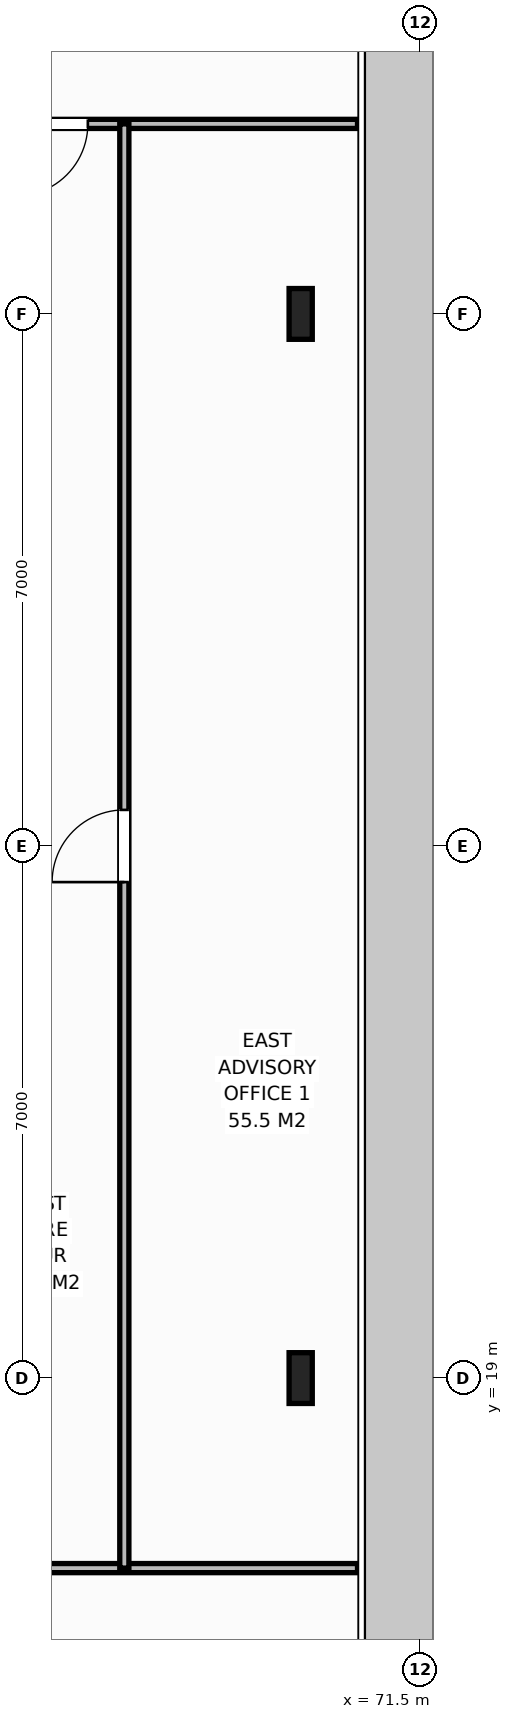
"""IFC4 building model, lengths in metres.
Left out: names, types, materials, properties, quantities, classifications, styles, units other than length and angle.
Written with IfcOpenShell. Run it as: python <this file> out.ifc"""

import sys

from ifc_helpers import new_model, si_unit, direction, frame, frame_2d, origin, origin_2d, place, context, subcontext, project, spatial, rectangle, i_section, extrude, element, fill, save


model = new_model("IFC4")
c1 = context("Model", 3, precision=1e-05, world=origin(), true_north=direction((0.0, 1.0)))
c2 = subcontext(c1, "Body", "Model", "MODEL_VIEW")
j1 = project(units=[si_unit("LENGTHUNIT", "METRE"), si_unit("PLANEANGLEUNIT", "RADIAN")], contexts=[c1])
p1 = place(None, origin())
s1 = spatial("IfcSite", under=j1, at=p1, CompositionType="ELEMENT")
p2 = place(p1, origin())
s2 = spatial("IfcBuilding", under=s1, at=p2, CompositionType="ELEMENT")
p3 = place(p2, frame((0.0, 0.0, 259.4)))
s3 = spatial("IfcBuildingStorey", under=s2, at=p3, CompositionType="ELEMENT", Elevation=259.4)
for number, where, z_axis, x_axis in (
    (1, (69.92, 19.0, 0.0), (0.0, 0.0, 1.0), (1.0, 0.0, 0.0)),
    (2, (69.92, 33.0, 0.0), (0.0, 0.0, 1.0), (1.0, 0.0, 0.0)),
):
    element("IfcColumn", number, at=place(p3, frame(where, z_axis=z_axis, x_axis=x_axis)), inside=s3, PredefinedType="COLUMN", context=c2, shape_type="SweptSolid", body=[
        extrude(i_section(OverallWidth=0.305, OverallDepth=0.668, WebThickness=0.021, FlangeThickness=0.04, at=origin_2d()), origin(), (0.0, 0.0, 1.0), 3.8),
    ])
p4 = place(p3, frame((64.952, 35.5, 0.0), z_axis=(0.0, 0.0, 1.0), x_axis=(1.0, 0.0, 0.0)))
e3 = element("IfcWall", 3, at=p4, inside=s3, PredefinedType="PARTITIONING", context=c2, shape_type="SweptSolid", body=[
    extrude(rectangle(XDim=5.716, YDim=0.12, at=frame_2d((2.858, 0.0))), origin(), (0.0, 0.0, 1.0), 3.588),
])
p5 = place(p4, frame((1.218, 0.0, 0.0)))
e4 = element("IfcOpeningElement", 4, at=p5, cuts=e3, PredefinedType="OPENING", context=c2, shape_type="SweptSolid", body=[
    extrude(rectangle(XDim=0.95, YDim=2.15, at=frame_2d((0.475, 1.075))), frame((0.0, 0.07, 0.0), z_axis=(0.0, -1.0, 0.0), x_axis=(1.0, 0.0, 0.0)), (0.0, 0.0, 1.0), 0.14),
])
p6 = place(p3, frame((56.817, 16.5, 0.0), z_axis=(0.0, 0.0, 1.0), x_axis=(1.0, 0.0, 0.0)))
e5 = element("IfcWall", 5, at=p6, inside=s3, PredefinedType="PARTITIONING", context=c2, shape_type="SweptSolid", body=[
    extrude(rectangle(XDim=13.851, YDim=0.12, at=frame_2d((6.925, 0.0))), origin(), (0.0, 0.0, 1.0), 3.588),
])
p7 = place(p6, frame((4.917, 0.0, 0.0)))
e6 = element("IfcOpeningElement", 6, at=p7, cuts=e5, PredefinedType="OPENING", context=c2, shape_type="SweptSolid", body=[
    extrude(rectangle(XDim=0.95, YDim=2.15, at=frame_2d((0.475, 1.075))), frame((0.0, 0.07, 0.0), z_axis=(0.0, -1.0, 0.0), x_axis=(1.0, 0.0, 0.0)), (0.0, 0.0, 1.0), 0.14),
])
p8 = place(p3, frame((67.6, 16.5, 0.0), z_axis=(0.0, 0.0, 1.0), x_axis=(0.0, 1.0, 0.0)))
e7 = element("IfcWall", 7, at=p8, inside=s3, PredefinedType="PARTITIONING", context=c2, shape_type="SweptSolid", body=[
    extrude(rectangle(XDim=19.0, YDim=0.12, at=frame_2d((9.5, 0.0))), origin(), (0.0, 0.0, 1.0), 3.588),
])
p9 = place(p8, frame((9.025, 0.0, 0.0)))
e8 = element("IfcOpeningElement", 8, at=p9, cuts=e7, PredefinedType="OPENING", context=c2, shape_type="SweptSolid", body=[
    extrude(rectangle(XDim=0.95, YDim=2.15, at=frame_2d((0.475, 1.075))), frame((0.0, 0.07, 0.0), z_axis=(0.0, -1.0, 0.0), x_axis=(1.0, 0.0, 0.0)), (0.0, 0.0, 1.0), 0.14),
])
p10 = place(p5, origin())
e9 = element("IfcDoor", 9, at=p10, inside=s3, OperationType="SINGLE_SWING_RIGHT", PredefinedType="DOOR", context=c2, shape_type="SweptSolid", body=[
    extrude(rectangle(XDim=0.95, YDim=2.15, at=frame_2d((0.475, 1.075))), frame((0.0, 0.025, 0.0), z_axis=(0.0, -1.0, 0.0), x_axis=(1.0, 0.0, 0.0)), (0.0, 0.0, 1.0), 0.05),
])
fill(e4, e9)
p11 = place(p9, origin())
e10 = element("IfcDoor", 10, at=p11, inside=s3, OperationType="SINGLE_SWING_LEFT", PredefinedType="DOOR", context=c2, shape_type="SweptSolid", body=[
    extrude(rectangle(XDim=0.95, YDim=2.15, at=frame_2d((0.475, 1.075))), frame((0.0, 0.025, 0.0), z_axis=(0.0, -1.0, 0.0), x_axis=(1.0, 0.0, 0.0)), (0.0, 0.0, 1.0), 0.05),
])
fill(e8, e10)
save(model, sys.argv[1])
